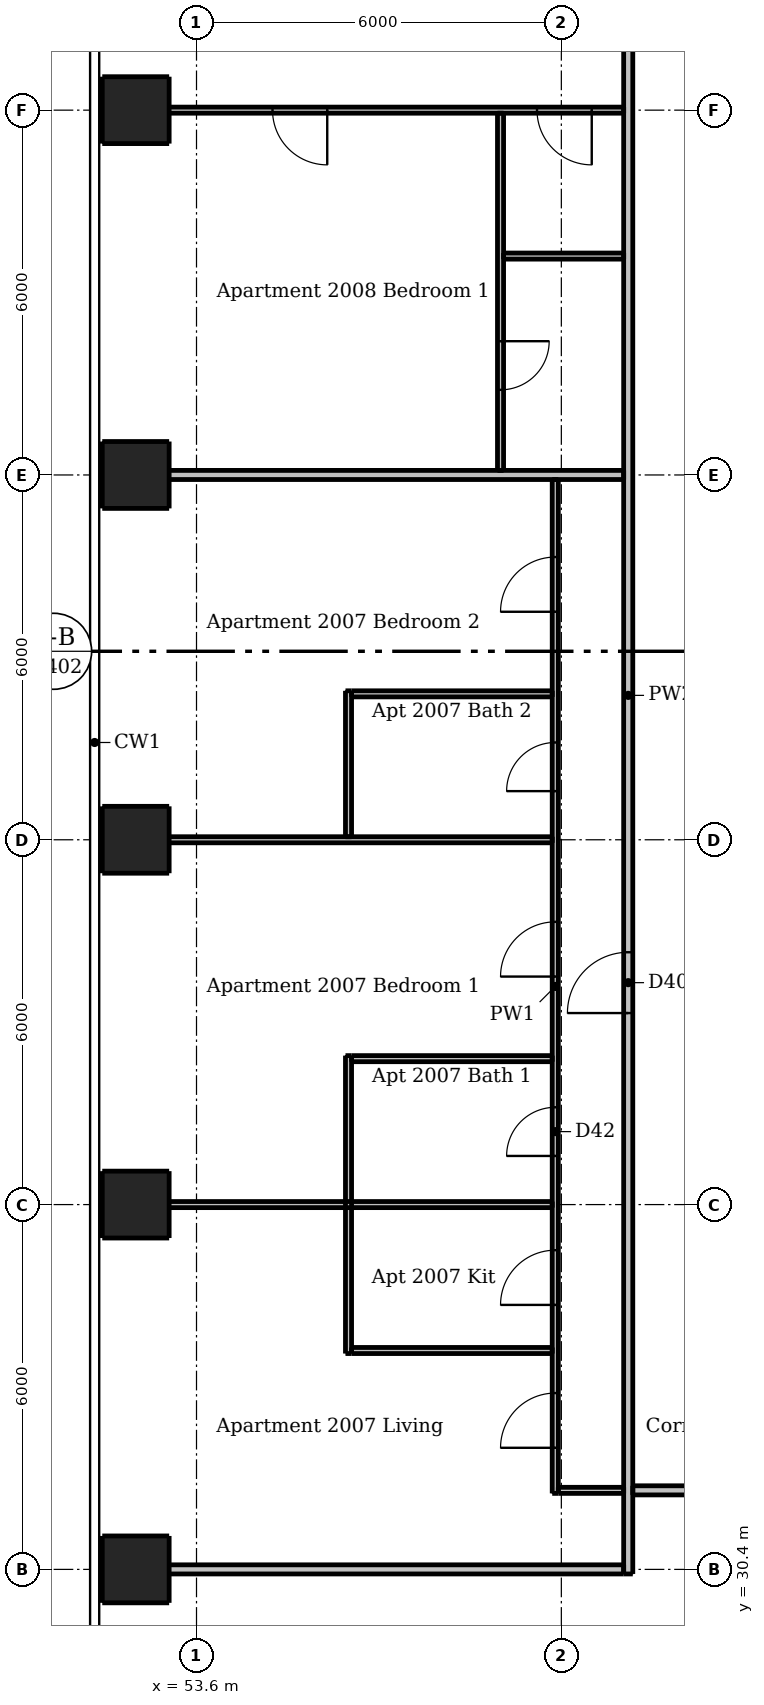
"""IFC4 building model, lengths in metres.
Left out: names, types, materials, properties, quantities, classifications, styles, units other than length and angle.
Written with IfcOpenShell. Run it as: python <this file> out.ifc"""

import sys

from ifc_helpers import new_model, si_unit, direction, frame, frame_2d, origin, origin_2d, place, context, subcontext, project, spatial, rectangle, extrude, element, fill, save


model = new_model("IFC4")
c1 = context("Model", 3, precision=1e-05, world=origin(), true_north=direction((0.0, 1.0)))
c2 = subcontext(c1, "Body", "Model", "MODEL_VIEW")
j1 = project(units=[si_unit("LENGTHUNIT", "METRE"), si_unit("PLANEANGLEUNIT", "RADIAN")], contexts=[c1])
p1 = place(None, origin())
s1 = spatial("IfcSite", under=j1, at=p1, CompositionType="ELEMENT")
p2 = place(p1, origin())
s2 = spatial("IfcBuilding", under=s1, at=p2, CompositionType="ELEMENT")
p3 = place(p2, frame((0.0, 0.0, 78.7)))
s3 = spatial("IfcBuildingStorey", under=s2, at=p3, CompositionType="ELEMENT", Elevation=78.7)
for number, where, z_axis, x_axis in (
    (1, (52.6, 30.4, 0.0), (0.0, 0.0, 1.0), (1.0, 0.0, 0.0)),
    (2, (52.6, 36.4, 0.0), (0.0, 0.0, 1.0), (1.0, 0.0, 0.0)),
    (3, (52.6, 42.4, 0.0), (0.0, 0.0, 1.0), (1.0, 0.0, 0.0)),
    (4, (52.6, 48.4, 0.0), (0.0, 0.0, 1.0), (1.0, 0.0, 0.0)),
    (5, (52.6, 54.4, 0.0), (0.0, 0.0, 1.0), (1.0, 0.0, 0.0)),
):
    element("IfcColumn", number, at=place(p3, frame(where, z_axis=z_axis, x_axis=x_axis)), inside=s3, PredefinedType="COLUMN", context=c2, shape_type="SweptSolid", body=[
        extrude(rectangle(XDim=1.1, YDim=1.1, at=origin_2d()), origin(), (0.0, 0.0, 1.0), 3.05),
    ])
p4 = place(p3, frame((56.1, 33.95, 0.0), z_axis=(0.0, 0.0, 1.0), x_axis=(0.0, 1.0, 0.0)))
e6 = element("IfcWall", 6, at=p4, inside=s3, PredefinedType="PARTITIONING", context=c2, shape_type="SweptSolid", body=[
    extrude(rectangle(XDim=4.9, YDim=0.1, at=frame_2d((2.45, 0.0))), origin(), (0.0, 0.0, 1.0), 3.05),
])
p5 = place(p3, frame((56.1, 42.45, 0.0), z_axis=(0.0, 0.0, 1.0), x_axis=(0.0, 1.0, 0.0)))
e7 = element("IfcWall", 7, at=p5, inside=s3, PredefinedType="PARTITIONING", context=c2, shape_type="SweptSolid", body=[
    extrude(rectangle(XDim=2.4, YDim=0.1, at=frame_2d((1.2, 0.0))), origin(), (0.0, 0.0, 1.0), 3.05),
])
p6 = place(p3, frame((58.6, 54.35, 0.0), z_axis=(0.0, 0.0, 1.0), x_axis=(0.0, -1.0, 0.0)))
e8 = element("IfcWall", 8, at=p6, inside=s3, PredefinedType="PARTITIONING", context=c2, shape_type="SweptSolid", body=[
    extrude(rectangle(XDim=5.875, YDim=0.1, at=frame_2d((2.938, 0.0))), origin(), (0.0, 0.0, 1.0), 3.05),
])
p7 = place(p6, frame((3.75, 0.0, 0.0)))
e9 = element("IfcOpeningElement", 9, at=p7, cuts=e8, PredefinedType="OPENING", context=c2, shape_type="SweptSolid", body=[
    extrude(rectangle(XDim=0.8, YDim=2.1, at=frame_2d((0.4, 1.05))), frame((0.0, 0.06, 0.0), z_axis=(0.0, -1.0, 0.0), x_axis=(1.0, 0.0, 0.0)), (0.0, 0.0, 1.0), 0.12),
])
p8 = place(p3, frame((59.5, 31.65, 0.0), z_axis=(0.0, 0.0, 1.0), x_axis=(0.0, 1.0, 0.0)))
e10 = element("IfcWall", 10, at=p8, inside=s3, PredefinedType="PARTITIONING", context=c2, shape_type="SweptSolid", body=[
    extrude(rectangle(XDim=16.675, YDim=0.1, at=frame_2d((8.337, 0.0))), origin(), (0.0, 0.0, 1.0), 2.51),
])
p9 = place(p8, frame((0.75, 0.0, 0.0)))
e11 = element("IfcOpeningElement", 11, at=p9, cuts=e10, PredefinedType="OPENING", context=c2, shape_type="SweptSolid", body=[
    extrude(rectangle(XDim=0.9, YDim=2.1, at=frame_2d((0.45, 1.05))), frame((0.0, 0.06, 0.0), z_axis=(0.0, -1.0, 0.0), x_axis=(1.0, 0.0, 0.0)), (0.0, 0.0, 1.0), 0.12),
])
p10 = place(p8, frame((3.1, 0.0, 0.0)))
e12 = element("IfcOpeningElement", 12, at=p10, cuts=e10, PredefinedType="OPENING", context=c2, shape_type="SweptSolid", body=[
    extrude(rectangle(XDim=0.9, YDim=2.1, at=frame_2d((0.45, 1.05))), frame((0.0, 0.06, 0.0), z_axis=(0.0, -1.0, 0.0), x_axis=(1.0, 0.0, 0.0)), (0.0, 0.0, 1.0), 0.12),
])
p11 = place(p8, frame((8.5, 0.0, 0.0)))
e13 = element("IfcOpeningElement", 13, at=p11, cuts=e10, PredefinedType="OPENING", context=c2, shape_type="SweptSolid", body=[
    extrude(rectangle(XDim=0.9, YDim=2.1, at=frame_2d((0.45, 1.05))), frame((0.0, 0.06, 0.0), z_axis=(0.0, -1.0, 0.0), x_axis=(1.0, 0.0, 0.0)), (0.0, 0.0, 1.0), 0.12),
])
p12 = place(p8, frame((14.5, 0.0, 0.0)))
e14 = element("IfcOpeningElement", 14, at=p12, cuts=e10, PredefinedType="OPENING", context=c2, shape_type="SweptSolid", body=[
    extrude(rectangle(XDim=0.9, YDim=2.1, at=frame_2d((0.45, 1.05))), frame((0.0, 0.06, 0.0), z_axis=(0.0, -1.0, 0.0), x_axis=(1.0, 0.0, 0.0)), (0.0, 0.0, 1.0), 0.12),
])
p13 = place(p8, frame((5.55, 0.0, 0.0)))
e15 = element("IfcOpeningElement", 15, at=p13, cuts=e10, PredefinedType="OPENING", context=c2, shape_type="SweptSolid", body=[
    extrude(rectangle(XDim=0.8, YDim=2.1, at=frame_2d((0.4, 1.05))), frame((0.0, 0.06, 0.0), z_axis=(0.0, -1.0, 0.0), x_axis=(1.0, 0.0, 0.0)), (0.0, 0.0, 1.0), 0.12),
])
p14 = place(p8, frame((11.55, 0.0, 0.0)))
e16 = element("IfcOpeningElement", 16, at=p14, cuts=e10, PredefinedType="OPENING", context=c2, shape_type="SweptSolid", body=[
    extrude(rectangle(XDim=0.8, YDim=2.1, at=frame_2d((0.4, 1.05))), frame((0.0, 0.06, 0.0), z_axis=(0.0, -1.0, 0.0), x_axis=(1.0, 0.0, 0.0)), (0.0, 0.0, 1.0), 0.12),
])
p15 = place(p3, frame((60.625, 54.4, 0.0), z_axis=(0.0, 0.0, 1.0), x_axis=(-1.0, 0.0, 0.0)))
e17 = element("IfcWall", 17, at=p15, inside=s3, PredefinedType="PARTITIONING", context=c2, shape_type="SweptSolid", body=[
    extrude(rectangle(XDim=8.625, YDim=0.1, at=frame_2d((4.312, 0.0))), origin(), (0.0, 0.0, 1.0), 2.516),
])
p16 = place(p15, frame((0.525, 0.0, 0.0)))
e18 = element("IfcOpeningElement", 18, at=p16, cuts=e17, PredefinedType="OPENING", context=c2, shape_type="SweptSolid", body=[
    extrude(rectangle(XDim=0.9, YDim=2.1, at=frame_2d((0.45, 1.05))), frame((0.0, 0.06, 0.0), z_axis=(0.0, -1.0, 0.0), x_axis=(1.0, 0.0, 0.0)), (0.0, 0.0, 1.0), 0.12),
])
p17 = place(p15, frame((4.875, 0.0, 0.0)))
e19 = element("IfcOpeningElement", 19, at=p17, cuts=e17, PredefinedType="OPENING", context=c2, shape_type="SweptSolid", body=[
    extrude(rectangle(XDim=0.9, YDim=2.1, at=frame_2d((0.45, 1.05))), frame((0.0, 0.06, 0.0), z_axis=(0.0, -1.0, 0.0), x_axis=(1.0, 0.0, 0.0)), (0.0, 0.0, 1.0), 0.12),
])
p18 = place(p3, frame((58.65, 52.0, 0.0), z_axis=(0.0, 0.0, 1.0), x_axis=(1.0, 0.0, 0.0)))
e20 = element("IfcWall", 20, at=p18, inside=s3, PredefinedType="PARTITIONING", context=c2, shape_type="SweptSolid", body=[
    extrude(rectangle(XDim=1.975, YDim=0.1, at=frame_2d((0.988, 0.0))), origin(), (0.0, 0.0, 1.0), 3.05),
])
p19 = place(p3, frame((56.15, 44.8, 0.0), z_axis=(0.0, 0.0, 1.0), x_axis=(1.0, 0.0, 0.0)))
e21 = element("IfcWall", 21, at=p19, inside=s3, PredefinedType="PARTITIONING", context=c2, shape_type="SweptSolid", body=[
    extrude(rectangle(XDim=3.3, YDim=0.1, at=frame_2d((1.65, 0.0))), origin(), (0.0, 0.0, 1.0), 3.05),
])
p20 = place(p3, frame((52.0, 42.4, 0.0), z_axis=(0.0, 0.0, 1.0), x_axis=(1.0, 0.0, 0.0)))
e22 = element("IfcWall", 22, at=p20, inside=s3, PredefinedType="PARTITIONING", context=c2, shape_type="SweptSolid", body=[
    extrude(rectangle(XDim=7.45, YDim=0.1, at=frame_2d((3.725, 0.0))), origin(), (0.0, 0.0, 1.0), 2.516),
])
p21 = place(p3, frame((56.15, 38.8, 0.0), z_axis=(0.0, 0.0, 1.0), x_axis=(1.0, 0.0, 0.0)))
e23 = element("IfcWall", 23, at=p21, inside=s3, PredefinedType="PARTITIONING", context=c2, shape_type="SweptSolid", body=[
    extrude(rectangle(XDim=3.3, YDim=0.1, at=frame_2d((1.65, 0.0))), origin(), (0.0, 0.0, 1.0), 3.05),
])
p22 = place(p3, frame((52.0, 36.4, 0.0), z_axis=(0.0, 0.0, 1.0), x_axis=(1.0, 0.0, 0.0)))
e24 = element("IfcWall", 24, at=p22, inside=s3, PredefinedType="PARTITIONING", context=c2, shape_type="SweptSolid", body=[
    extrude(rectangle(XDim=7.45, YDim=0.1, at=frame_2d((3.725, 0.0))), origin(), (0.0, 0.0, 1.0), 2.516),
])
p23 = place(p3, frame((56.15, 34.0, 0.0), z_axis=(0.0, 0.0, 1.0), x_axis=(1.0, 0.0, 0.0)))
e25 = element("IfcWall", 25, at=p23, inside=s3, PredefinedType="PARTITIONING", context=c2, shape_type="SweptSolid", body=[
    extrude(rectangle(XDim=3.3, YDim=0.1, at=frame_2d((1.65, 0.0))), origin(), (0.0, 0.0, 1.0), 3.05),
])
p24 = place(p3, frame((59.55, 31.7, 0.0), z_axis=(0.0, 0.0, 1.0), x_axis=(1.0, 0.0, 0.0)))
e26 = element("IfcWall", 26, at=p24, inside=s3, PredefinedType="PARTITIONING", context=c2, shape_type="SweptSolid", body=[
    extrude(rectangle(XDim=1.075, YDim=0.1, at=frame_2d((0.538, 0.0))), origin(), (0.0, 0.0, 1.0), 3.05),
])
p25 = place(p3, frame((60.7, 30.325, 0.0), z_axis=(0.0, 0.0, 1.0), x_axis=(0.0, 1.0, 0.0)))
e27 = element("IfcWall", 27, at=p25, inside=s3, PredefinedType="PARTITIONING", context=c2, shape_type="SweptSolid", body=[
    extrude(rectangle(XDim=28.9, YDim=0.15, at=frame_2d((14.45, 0.0))), origin(), (0.0, 0.0, 1.0), 3.05),
])
p26 = place(p25, frame((9.225, 0.0, 0.0)))
e28 = element("IfcOpeningElement", 28, at=p26, cuts=e27, PredefinedType="OPENING", context=c2, shape_type="SweptSolid", body=[
    extrude(rectangle(XDim=1.0, YDim=2.1, at=frame_2d((0.5, 1.05))), frame((0.0, 0.085, 0.0), z_axis=(0.0, -1.0, 0.0), x_axis=(1.0, 0.0, 0.0)), (0.0, 0.0, 1.0), 0.17),
])
p27 = place(p25, frame((26.025, 0.0, 0.0)))
e29 = element("IfcOpeningElement", 29, at=p27, cuts=e27, PredefinedType="OPENING", context=c2, shape_type="SweptSolid", body=[
    extrude(rectangle(XDim=1.0, YDim=2.1, at=frame_2d((0.5, 1.05))), frame((0.0, 0.085, 0.0), z_axis=(0.0, -1.0, 0.0), x_axis=(1.0, 0.0, 0.0)), (0.0, 0.0, 1.0), 0.17),
])
p28 = place(p3, frame((52.0, 48.4, 0.0), z_axis=(0.0, 0.0, 1.0), x_axis=(1.0, 0.0, 0.0)))
e30 = element("IfcWall", 30, at=p28, inside=s3, PredefinedType="PARTITIONING", context=c2, shape_type="SweptSolid", body=[
    extrude(rectangle(XDim=8.625, YDim=0.15, at=frame_2d((4.312, 0.0))), origin(), (0.0, 0.0, 1.0), 2.516),
])
p29 = place(p3, frame((89.525, 31.7, 0.0), z_axis=(0.0, 0.0, 1.0), x_axis=(-1.0, 0.0, 0.0)))
e31 = element("IfcWall", 31, at=p29, inside=s3, PredefinedType="PARTITIONING", context=c2, shape_type="SweptSolid", body=[
    extrude(rectangle(XDim=28.75, YDim=0.15, at=frame_2d((14.375, 0.0))), origin(), (0.0, 0.0, 1.0), 3.05),
])
p30 = place(p29, frame((24.625, 0.0, 0.0)))
e32 = element("IfcOpeningElement", 32, at=p30, cuts=e31, PredefinedType="OPENING", context=c2, shape_type="SweptSolid", body=[
    extrude(rectangle(XDim=1.0, YDim=2.1, at=frame_2d((0.5, 1.05))), frame((0.0, 0.085, 0.0), z_axis=(0.0, -1.0, 0.0), x_axis=(1.0, 0.0, 0.0)), (0.0, 0.0, 1.0), 0.17),
])
p31 = place(p29, frame((7.525, 0.0, 0.0)))
e33 = element("IfcOpeningElement", 33, at=p31, cuts=e31, PredefinedType="OPENING", context=c2, shape_type="SweptSolid", body=[
    extrude(rectangle(XDim=1.0, YDim=2.1, at=frame_2d((0.5, 1.05))), frame((0.0, 0.085, 0.0), z_axis=(0.0, -1.0, 0.0), x_axis=(1.0, 0.0, 0.0)), (0.0, 0.0, 1.0), 0.17),
])
p32 = place(p3, frame((52.0, 30.4, 0.0), z_axis=(0.0, 0.0, 1.0), x_axis=(1.0, 0.0, 0.0)))
e34 = element("IfcWall", 34, at=p32, inside=s3, PredefinedType="PARTITIONING", context=c2, shape_type="SweptSolid", body=[
    extrude(rectangle(XDim=8.625, YDim=0.15, at=frame_2d((4.312, 0.0))), origin(), (0.0, 0.0, 1.0), 2.647),
])
p33 = place(p26, origin())
e35 = element("IfcDoor", 35, at=p33, inside=s3, OperationType="SINGLE_SWING_LEFT", PredefinedType="DOOR", context=c2, shape_type="SweptSolid", body=[
    extrude(rectangle(XDim=1.0, YDim=2.1, at=frame_2d((0.5, 1.05))), frame((0.0, 0.025, 0.0), z_axis=(0.0, -1.0, 0.0), x_axis=(1.0, 0.0, 0.0)), (0.0, 0.0, 1.0), 0.05),
])
fill(e28, e35)
p34 = place(p9, origin())
e36 = element("IfcDoor", 36, at=p34, inside=s3, OperationType="SINGLE_SWING_LEFT", PredefinedType="DOOR", context=c2, shape_type="SweptSolid", body=[
    extrude(rectangle(XDim=0.9, YDim=2.1, at=frame_2d((0.45, 1.05))), frame((0.0, 0.025, 0.0), z_axis=(0.0, -1.0, 0.0), x_axis=(1.0, 0.0, 0.0)), (0.0, 0.0, 1.0), 0.05),
])
fill(e11, e36)
p35 = place(p10, origin())
e37 = element("IfcDoor", 37, at=p35, inside=s3, OperationType="SINGLE_SWING_LEFT", PredefinedType="DOOR", context=c2, shape_type="SweptSolid", body=[
    extrude(rectangle(XDim=0.9, YDim=2.1, at=frame_2d((0.45, 1.05))), frame((0.0, 0.025, 0.0), z_axis=(0.0, -1.0, 0.0), x_axis=(1.0, 0.0, 0.0)), (0.0, 0.0, 1.0), 0.05),
])
fill(e12, e37)
p36 = place(p11, origin())
e38 = element("IfcDoor", 38, at=p36, inside=s3, OperationType="SINGLE_SWING_LEFT", PredefinedType="DOOR", context=c2, shape_type="SweptSolid", body=[
    extrude(rectangle(XDim=0.9, YDim=2.1, at=frame_2d((0.45, 1.05))), frame((0.0, 0.025, 0.0), z_axis=(0.0, -1.0, 0.0), x_axis=(1.0, 0.0, 0.0)), (0.0, 0.0, 1.0), 0.05),
])
fill(e13, e38)
p37 = place(p12, origin())
e39 = element("IfcDoor", 39, at=p37, inside=s3, OperationType="SINGLE_SWING_LEFT", PredefinedType="DOOR", context=c2, shape_type="SweptSolid", body=[
    extrude(rectangle(XDim=0.9, YDim=2.1, at=frame_2d((0.45, 1.05))), frame((0.0, 0.025, 0.0), z_axis=(0.0, -1.0, 0.0), x_axis=(1.0, 0.0, 0.0)), (0.0, 0.0, 1.0), 0.05),
])
fill(e14, e39)
p38 = place(p13, origin())
e40 = element("IfcDoor", 40, at=p38, inside=s3, OperationType="SINGLE_SWING_LEFT", PredefinedType="DOOR", context=c2, shape_type="SweptSolid", body=[
    extrude(rectangle(XDim=0.8, YDim=2.1, at=frame_2d((0.4, 1.05))), frame((0.0, 0.025, 0.0), z_axis=(0.0, -1.0, 0.0), x_axis=(1.0, 0.0, 0.0)), (0.0, 0.0, 1.0), 0.05),
])
fill(e15, e40)
p39 = place(p14, origin())
e41 = element("IfcDoor", 41, at=p39, inside=s3, OperationType="SINGLE_SWING_LEFT", PredefinedType="DOOR", context=c2, shape_type="SweptSolid", body=[
    extrude(rectangle(XDim=0.8, YDim=2.1, at=frame_2d((0.4, 1.05))), frame((0.0, 0.025, 0.0), z_axis=(0.0, -1.0, 0.0), x_axis=(1.0, 0.0, 0.0)), (0.0, 0.0, 1.0), 0.05),
])
fill(e16, e41)
p40 = place(p16, origin())
e42 = element("IfcDoor", 42, at=p40, inside=s3, OperationType="SINGLE_SWING_LEFT", PredefinedType="DOOR", context=c2, shape_type="SweptSolid", body=[
    extrude(rectangle(XDim=0.9, YDim=2.1, at=frame_2d((0.45, 1.05))), frame((0.0, 0.025, 0.0), z_axis=(0.0, -1.0, 0.0), x_axis=(1.0, 0.0, 0.0)), (0.0, 0.0, 1.0), 0.05),
])
fill(e18, e42)
p41 = place(p17, origin())
e43 = element("IfcDoor", 43, at=p41, inside=s3, OperationType="SINGLE_SWING_LEFT", PredefinedType="DOOR", context=c2, shape_type="SweptSolid", body=[
    extrude(rectangle(XDim=0.9, YDim=2.1, at=frame_2d((0.45, 1.05))), frame((0.0, 0.025, 0.0), z_axis=(0.0, -1.0, 0.0), x_axis=(1.0, 0.0, 0.0)), (0.0, 0.0, 1.0), 0.05),
])
fill(e19, e43)
p42 = place(p7, origin())
e44 = element("IfcDoor", 44, at=p42, inside=s3, OperationType="SINGLE_SWING_LEFT", PredefinedType="DOOR", context=c2, shape_type="SweptSolid", body=[
    extrude(rectangle(XDim=0.8, YDim=2.1, at=frame_2d((0.4, 1.05))), frame((0.0, 0.025, 0.0), z_axis=(0.0, -1.0, 0.0), x_axis=(1.0, 0.0, 0.0)), (0.0, 0.0, 1.0), 0.05),
])
fill(e9, e44)
save(model, sys.argv[1])
